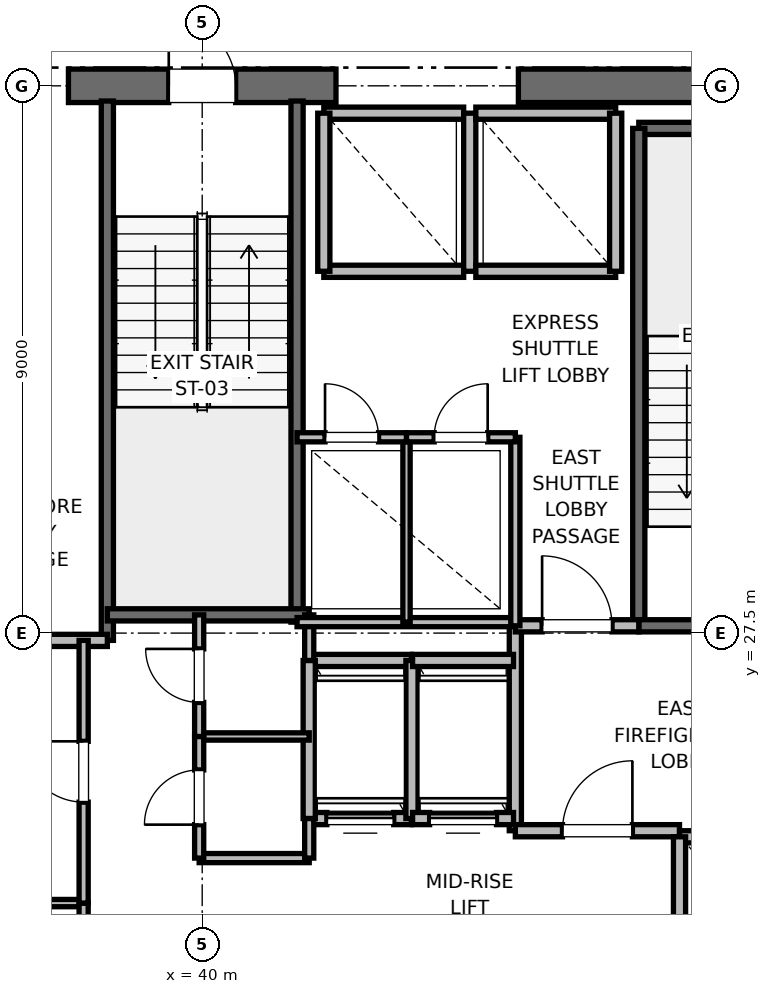
"""IFC4 building model, lengths in metres.
Left out: names, types, materials, properties, quantities, classifications, styles, units other than length and angle.
Written with IfcOpenShell. Run it as: python <this file> out.ifc"""

import sys

from ifc_helpers import new_model, si_unit, direction, frame, frame_2d, origin, place, context, subcontext, project, spatial, rectangle, extrude, element, fill, save


model = new_model("IFC4")
c1 = context("Model", 3, precision=1e-05, world=origin(), true_north=direction((0.0, 1.0)))
c2 = subcontext(c1, "Body", "Model", "MODEL_VIEW")
j1 = project(units=[si_unit("LENGTHUNIT", "METRE"), si_unit("PLANEANGLEUNIT", "RADIAN")], contexts=[c1])
p1 = place(None, origin())
s1 = spatial("IfcSite", under=j1, at=p1, CompositionType="ELEMENT")
p2 = place(p1, origin())
s2 = spatial("IfcBuilding", under=s1, at=p2, CompositionType="ELEMENT")
p3 = place(p2, frame((0.0, 0.0, 132.4)))
s3 = spatial("IfcBuildingStorey", under=s2, at=p3, CompositionType="ELEMENT", Elevation=132.4)
p4 = place(p3, frame((37.8, 36.5, 0.0), z_axis=(0.0, 0.0, 1.0), x_axis=(1.0, 0.0, 0.0)))
e1 = element("IfcWall", 1, at=p4, inside=s3, PredefinedType="SHEAR", context=c2, shape_type="SweptSolid", body=[
    extrude(rectangle(XDim=4.4, YDim=0.55, at=frame_2d((2.2, 0.0))), origin(), (0.0, 0.0, 1.0), 3.775),
])
p5 = place(p4, frame((1.65, 0.0, 0.0)))
e2 = element("IfcOpeningElement", 2, at=p5, cuts=e1, PredefinedType="OPENING", context=c2, shape_type="SweptSolid", body=[
    extrude(rectangle(XDim=1.1, YDim=2.15, at=frame_2d((0.55, 1.075))), frame((0.0, 0.275, 0.0), z_axis=(0.0, -1.0, 0.0), x_axis=(1.0, 0.0, 0.0)), (0.0, 0.0, 1.0), 0.55),
])
p6 = place(p3, frame((45.2, 36.5, 0.0), z_axis=(0.0, 0.0, 1.0), x_axis=(1.0, 0.0, 0.0)))
e3 = element("IfcWall", 3, at=p6, inside=s3, PredefinedType="SHEAR", context=c2, shape_type="SweptSolid", body=[
    extrude(rectangle(XDim=5.8, YDim=0.55, at=frame_2d((2.9, 0.0))), origin(), (0.0, 0.0, 1.0), 3.775),
])
p7 = place(p3, frame((47.18, 35.8, 0.0), z_axis=(0.0, 0.0, 1.0), x_axis=(1.0, 0.0, 0.0)))
e4 = element("IfcWall", 4, at=p7, inside=s3, PredefinedType="SOLIDWALL", context=c2, shape_type="SweptSolid", body=[
    extrude(rectangle(XDim=3.12, YDim=0.2, at=frame_2d((1.56, 0.0))), origin(), (0.0, 0.0, 1.0), 3.775),
])
p8 = place(p3, frame((47.18, 27.62, 0.0), z_axis=(0.0, 0.0, 1.0), x_axis=(0.0, 1.0, 0.0)))
e5 = element("IfcWall", 5, at=p8, inside=s3, PredefinedType="SOLIDWALL", context=c2, shape_type="SweptSolid", body=[
    extrude(rectangle(XDim=8.18, YDim=0.2, at=frame_2d((4.09, 0.0))), origin(), (0.0, 0.0, 1.0), 3.775),
])
p9 = place(p3, frame((47.18, 27.62, 0.0), z_axis=(0.0, 0.0, 1.0), x_axis=(1.0, 0.0, 0.0)))
e6 = element("IfcWall", 6, at=p9, inside=s3, PredefinedType="SOLIDWALL", context=c2, shape_type="SweptSolid", body=[
    extrude(rectangle(XDim=3.12, YDim=0.2, at=frame_2d((1.56, 0.0))), origin(), (0.0, 0.0, 1.0), 3.775),
])
p10 = place(p9, frame((1.01, 0.0, 0.0)))
e7 = element("IfcOpeningElement", 7, at=p10, cuts=e6, PredefinedType="OPENING", context=c2, shape_type="SweptSolid", body=[
    extrude(rectangle(XDim=1.1, YDim=2.15, at=frame_2d((0.55, 1.075))), frame((0.0, 0.1, 0.0), z_axis=(0.0, -1.0, 0.0), x_axis=(1.0, 0.0, 0.0)), (0.0, 0.0, 1.0), 0.2),
])
p11 = place(p3, frame((38.44, 27.38, 0.0), z_axis=(0.0, 0.0, 1.0), x_axis=(0.0, 1.0, 0.0)))
e8 = element("IfcWall", 8, at=p11, inside=s3, PredefinedType="SOLIDWALL", context=c2, shape_type="SweptSolid", body=[
    extrude(rectangle(XDim=8.87, YDim=0.2, at=frame_2d((4.435, 0.0))), origin(), (0.0, 0.0, 1.0), 3.775),
])
p12 = place(p3, frame((41.56, 27.68, 0.0), z_axis=(0.0, 0.0, 1.0), x_axis=(0.0, 1.0, 0.0)))
e9 = element("IfcWall", 9, at=p12, inside=s3, PredefinedType="SOLIDWALL", context=c2, shape_type="SweptSolid", body=[
    extrude(rectangle(XDim=8.57, YDim=0.2, at=frame_2d((4.285, 0.0))), origin(), (0.0, 0.0, 1.0), 3.775),
])
p13 = place(p3, frame((38.44, 27.8, 0.0), z_axis=(0.0, 0.0, 1.0), x_axis=(1.0, 0.0, 0.0)))
e10 = element("IfcWall", 10, at=p13, inside=s3, PredefinedType="SOLIDWALL", context=c2, shape_type="SweptSolid", body=[
    extrude(rectangle(XDim=3.32, YDim=0.2, at=frame_2d((1.66, 0.0))), origin(), (0.0, 0.0, 1.0), 3.775),
])
p14 = place(p3, frame((32.82, 27.38, 0.0), z_axis=(0.0, 0.0, 1.0), x_axis=(1.0, 0.0, 0.0)))
e11 = element("IfcWall", 11, at=p14, inside=s3, PredefinedType="PARTITIONING", context=c2, shape_type="SweptSolid", body=[
    extrude(rectangle(XDim=5.62, YDim=0.2, at=frame_2d((2.81, 0.0))), origin(), (0.0, 0.0, 1.0), 3.775),
])
p15 = place(p3, frame((45.15, 24.25, 0.0), z_axis=(0.0, 0.0, 1.0), x_axis=(0.0, 1.0, 0.0)))
e12 = element("IfcWall", 12, at=p15, inside=s3, PredefinedType="PARTITIONING", context=c2, shape_type="SweptSolid", body=[
    extrude(rectangle(XDim=3.37, YDim=0.2, at=frame_2d((1.685, 0.0))), origin(), (0.0, 0.0, 1.0), 3.775),
])
p16 = place(p3, frame((45.15, 24.25, 0.0), z_axis=(0.0, 0.0, 1.0), x_axis=(1.0, 0.0, 0.0)))
e13 = element("IfcWall", 13, at=p16, inside=s3, PredefinedType="PARTITIONING", context=c2, shape_type="SweptSolid", body=[
    extrude(rectangle(XDim=2.7, YDim=0.2, at=frame_2d((1.35, 0.0))), origin(), (0.0, 0.0, 1.0), 3.775),
])
p17 = place(p16, frame((0.775, 0.0, 0.0)))
e14 = element("IfcOpeningElement", 14, at=p17, cuts=e13, PredefinedType="OPENING", context=c2, shape_type="SweptSolid", body=[
    extrude(rectangle(XDim=1.15, YDim=2.2, at=frame_2d((0.575, 1.1))), frame((0.0, 0.1, 0.0), z_axis=(0.0, -1.0, 0.0), x_axis=(1.0, 0.0, 0.0)), (0.0, 0.0, 1.0), 0.2),
])
p18 = place(p3, frame((45.15, 27.62, 0.0), z_axis=(0.0, 0.0, 1.0), x_axis=(1.0, 0.0, 0.0)))
e15 = element("IfcWall", 15, at=p18, inside=s3, PredefinedType="PARTITIONING", context=c2, shape_type="SweptSolid", body=[
    extrude(rectangle(XDim=2.03, YDim=0.2, at=frame_2d((1.015, 0.0))), origin(), (0.0, 0.0, 1.0), 3.775),
])
p19 = place(p18, frame((0.44, 0.0, 0.0)))
e16 = element("IfcOpeningElement", 16, at=p19, cuts=e15, PredefinedType="OPENING", context=c2, shape_type="SweptSolid", body=[
    extrude(rectangle(XDim=1.15, YDim=2.2, at=frame_2d((0.575, 1.1))), frame((0.0, 0.1, 0.0), z_axis=(0.0, -1.0, 0.0), x_axis=(1.0, 0.0, 0.0)), (0.0, 0.0, 1.0), 0.2),
])
p20 = place(p3, frame((50.45, 24.15, 0.0), z_axis=(0.0, 0.0, 1.0), x_axis=(-1.0, 0.0, 0.0)))
e17 = element("IfcWall", 17, at=p20, inside=s3, PredefinedType="SOLIDWALL", context=c2, shape_type="SweptSolid", body=[
    extrude(rectangle(XDim=2.6, YDim=0.2, at=frame_2d((1.3, 0.0))), origin(), (0.0, 0.0, 1.0), 2.755),
])
p21 = place(p20, frame((0.75, 0.0, 0.0)))
e18 = element("IfcOpeningElement", 18, at=p21, cuts=e17, PredefinedType="OPENING", context=c2, shape_type="SweptSolid", body=[
    extrude(rectangle(XDim=1.1, YDim=2.2, at=frame_2d((0.55, 1.1))), frame((0.0, 0.1, 0.0), z_axis=(0.0, -1.0, 0.0), x_axis=(1.0, 0.0, 0.0)), (0.0, 0.0, 1.0), 0.2),
])
p22 = place(p3, frame((47.85, 24.15, 0.0), z_axis=(0.0, 0.0, 1.0), x_axis=(0.0, -1.0, 0.0)))
e19 = element("IfcWall", 19, at=p22, inside=s3, PredefinedType="SOLIDWALL", context=c2, shape_type="SweptSolid", body=[
    extrude(rectangle(XDim=3.0, YDim=0.2, at=frame_2d((1.5, 0.0))), origin(), (0.0, 0.0, 1.0), 3.775),
])
p23 = place(p3, frame((41.76, 24.45, 0.0), z_axis=(0.0, 0.0, 1.0), x_axis=(1.0, 0.0, 0.0)))
e20 = element("IfcWall", 20, at=p23, inside=s3, PredefinedType="SOLIDWALL", context=c2, shape_type="SweptSolid", body=[
    extrude(rectangle(XDim=1.68, YDim=0.2, at=frame_2d((0.84, 0.0))), origin(), (0.0, 0.0, 1.0), 3.775),
])
p24 = place(p23, frame((0.29, 0.0, 0.0)))
e21 = element("IfcOpeningElement", 21, at=p24, cuts=e20, PredefinedType="OPENING", context=c2, shape_type="SweptSolid", body=[
    extrude(rectangle(XDim=1.1, YDim=2.2, at=frame_2d((0.55, 1.1))), frame((0.0, 0.1, 0.0), z_axis=(0.0, -1.0, 0.0), x_axis=(1.0, 0.0, 0.0)), (0.0, 0.0, 1.0), 0.2),
])
p25 = place(p3, frame((43.44, 27.05, 0.0), z_axis=(0.0, 0.0, 1.0), x_axis=(-1.0, 0.0, 0.0)))
e22 = element("IfcWall", 22, at=p25, inside=s3, PredefinedType="SOLIDWALL", context=c2, shape_type="SweptSolid", body=[
    extrude(rectangle(XDim=1.68, YDim=0.2, at=frame_2d((0.84, 0.0))), origin(), (0.0, 0.0, 1.0), 3.775),
])
for number, where, z_axis, x_axis in (
    (23, (41.76, 27.05, 0.0), (0.0, 0.0, 1.0), (0.0, -1.0, 0.0)),
    (24, (43.45, 24.45, 0.0), (0.0, 0.0, 1.0), (0.0, 1.0, 0.0)),
):
    element("IfcWall", number, at=place(p3, frame(where, z_axis=z_axis, x_axis=x_axis)), inside=s3, PredefinedType="SOLIDWALL", context=c2, shape_type="SweptSolid", body=[
        extrude(rectangle(XDim=2.6, YDim=0.2, at=frame_2d((1.3, 0.0))), origin(), (0.0, 0.0, 1.0), 3.775),
    ])
p26 = place(p3, frame((43.46, 24.45, 0.0), z_axis=(0.0, 0.0, 1.0), x_axis=(1.0, 0.0, 0.0)))
e25 = element("IfcWall", 25, at=p26, inside=s3, PredefinedType="SOLIDWALL", context=c2, shape_type="SweptSolid", body=[
    extrude(rectangle(XDim=1.66, YDim=0.2, at=frame_2d((0.83, 0.0))), origin(), (0.0, 0.0, 1.0), 3.775),
])
p27 = place(p26, frame((0.28, 0.0, 0.0)))
e26 = element("IfcOpeningElement", 26, at=p27, cuts=e25, PredefinedType="OPENING", context=c2, shape_type="SweptSolid", body=[
    extrude(rectangle(XDim=1.1, YDim=2.2, at=frame_2d((0.55, 1.1))), frame((0.0, 0.1, 0.0), z_axis=(0.0, -1.0, 0.0), x_axis=(1.0, 0.0, 0.0)), (0.0, 0.0, 1.0), 0.2),
])
p28 = place(p3, frame((45.12, 27.05, 0.0), z_axis=(0.0, 0.0, 1.0), x_axis=(-1.0, 0.0, 0.0)))
e27 = element("IfcWall", 27, at=p28, inside=s3, PredefinedType="SOLIDWALL", context=c2, shape_type="SweptSolid", body=[
    extrude(rectangle(XDim=1.66, YDim=0.2, at=frame_2d((0.83, 0.0))), origin(), (0.0, 0.0, 1.0), 3.775),
])
p29 = place(p3, frame((42.0, 33.45, 0.0), z_axis=(0.0, 0.0, 1.0), x_axis=(1.0, 0.0, 0.0)))
e28 = element("IfcWall", 28, at=p29, inside=s3, PredefinedType="SOLIDWALL", context=c2, shape_type="SweptSolid", body=[
    extrude(rectangle(XDim=2.3, YDim=0.2, at=frame_2d((1.15, 0.0))), origin(), (0.0, 0.0, 1.0), 3.775),
])
p30 = place(p3, frame((44.3, 36.05, 0.0), z_axis=(0.0, 0.0, 1.0), x_axis=(-1.0, 0.0, 0.0)))
e29 = element("IfcWall", 29, at=p30, inside=s3, PredefinedType="SOLIDWALL", context=c2, shape_type="SweptSolid", body=[
    extrude(rectangle(XDim=2.3, YDim=0.2, at=frame_2d((1.15, 0.0))), origin(), (0.0, 0.0, 1.0), 2.755),
])
for number, where, z_axis, x_axis in (
    (30, (42.0, 36.05, 0.0), (0.0, 0.0, 1.0), (0.0, -1.0, 0.0)),
    (31, (44.4, 33.45, 0.0), (0.0, 0.0, 1.0), (0.0, 1.0, 0.0)),
):
    element("IfcWall", number, at=place(p3, frame(where, z_axis=z_axis, x_axis=x_axis)), inside=s3, PredefinedType="SOLIDWALL", context=c2, shape_type="SweptSolid", body=[
        extrude(rectangle(XDim=2.6, YDim=0.2, at=frame_2d((1.3, 0.0))), origin(), (0.0, 0.0, 1.0), 2.755),
    ])
p31 = place(p3, frame((44.5, 33.45, 0.0), z_axis=(0.0, 0.0, 1.0), x_axis=(1.0, 0.0, 0.0)))
e32 = element("IfcWall", 32, at=p31, inside=s3, PredefinedType="SOLIDWALL", context=c2, shape_type="SweptSolid", body=[
    extrude(rectangle(XDim=2.3, YDim=0.2, at=frame_2d((1.15, 0.0))), origin(), (0.0, 0.0, 1.0), 3.775),
])
p32 = place(p3, frame((46.8, 36.05, 0.0), z_axis=(0.0, 0.0, 1.0), x_axis=(-1.0, 0.0, 0.0)))
e33 = element("IfcWall", 33, at=p32, inside=s3, PredefinedType="SOLIDWALL", context=c2, shape_type="SweptSolid", body=[
    extrude(rectangle(XDim=2.3, YDim=0.2, at=frame_2d((1.15, 0.0))), origin(), (0.0, 0.0, 1.0), 2.755),
])
p33 = place(p3, frame((46.8, 33.45, 0.0), z_axis=(0.0, 0.0, 1.0), x_axis=(0.0, 1.0, 0.0)))
e34 = element("IfcWall", 34, at=p33, inside=s3, PredefinedType="SOLIDWALL", context=c2, shape_type="SweptSolid", body=[
    extrude(rectangle(XDim=2.6, YDim=0.2, at=frame_2d((1.3, 0.0))), origin(), (0.0, 0.0, 1.0), 3.775),
])
p34 = place(p3, frame((39.95, 23.8, 0.0), z_axis=(0.0, 0.0, 1.0), x_axis=(1.0, 0.0, 0.0)))
e35 = element("IfcWall", 35, at=p34, inside=s3, PredefinedType="PARTITIONING", context=c2, shape_type="SweptSolid", body=[
    extrude(rectangle(XDim=1.81, YDim=0.15, at=frame_2d((0.905, 0.0))), origin(), (0.0, 0.0, 1.0), 2.85),
])
p35 = place(p3, frame((39.95, 25.8, 0.0), z_axis=(0.0, 0.0, 1.0), x_axis=(1.0, 0.0, 0.0)))
e36 = element("IfcWall", 36, at=p35, inside=s3, PredefinedType="PARTITIONING", context=c2, shape_type="SweptSolid", body=[
    extrude(rectangle(XDim=1.81, YDim=0.12, at=frame_2d((0.905, 0.0))), origin(), (0.0, 0.0, 1.0), 2.85),
])
p36 = place(p3, frame((41.76, 23.8, 0.0), z_axis=(0.0, 0.0, 1.0), x_axis=(0.0, 1.0, 0.0)))
e37 = element("IfcWall", 37, at=p36, inside=s3, PredefinedType="PARTITIONING", context=c2, shape_type="SweptSolid", body=[
    extrude(rectangle(XDim=0.65, YDim=0.15, at=frame_2d((0.325, 0.0))), origin(), (0.0, 0.0, 1.0), 2.85),
])
p37 = place(p3, frame((41.76, 27.05, 0.0), z_axis=(0.0, 0.0, 1.0), x_axis=(0.0, 1.0, 0.0)))
e38 = element("IfcWall", 38, at=p37, inside=s3, PredefinedType="PARTITIONING", context=c2, shape_type="SweptSolid", body=[
    extrude(rectangle(XDim=0.75, YDim=0.15, at=frame_2d((0.375, 0.0))), origin(), (0.0, 0.0, 1.0), 2.85),
])
p38 = place(p3, frame((39.95, 23.8, 0.0), z_axis=(0.0, 0.0, 1.0), x_axis=(0.0, 1.0, 0.0)))
e39 = element("IfcWall", 39, at=p38, inside=s3, PredefinedType="PARTITIONING", context=c2, shape_type="SweptSolid", body=[
    extrude(rectangle(XDim=2.0, YDim=0.15, at=frame_2d((1.0, 0.0))), origin(), (0.0, 0.0, 1.0), 2.85),
])
p39 = place(p38, frame((0.55, 0.0, 0.0)))
e40 = element("IfcOpeningElement", 40, at=p39, cuts=e39, PredefinedType="OPENING", context=c2, shape_type="SweptSolid", body=[
    extrude(rectangle(XDim=0.9, YDim=2.1, at=frame_2d((0.45, 1.05))), frame((0.0, 0.075, 0.0), z_axis=(0.0, -1.0, 0.0), x_axis=(1.0, 0.0, 0.0)), (0.0, 0.0, 1.0), 0.15),
])
p40 = place(p3, frame((39.95, 25.8, 0.0), z_axis=(0.0, 0.0, 1.0), x_axis=(0.0, 1.0, 0.0)))
e41 = element("IfcWall", 41, at=p40, inside=s3, PredefinedType="PARTITIONING", context=c2, shape_type="SweptSolid", body=[
    extrude(rectangle(XDim=2.0, YDim=0.15, at=frame_2d((1.0, 0.0))), origin(), (0.0, 0.0, 1.0), 2.85),
])
p41 = place(p40, frame((0.56, 0.0, 0.0)))
e42 = element("IfcOpeningElement", 42, at=p41, cuts=e41, PredefinedType="OPENING", context=c2, shape_type="SweptSolid", body=[
    extrude(rectangle(XDim=0.88, YDim=2.1, at=frame_2d((0.44, 1.05))), frame((0.0, 0.075, 0.0), z_axis=(0.0, -1.0, 0.0), x_axis=(1.0, 0.0, 0.0)), (0.0, 0.0, 1.0), 0.15),
])
p42 = place(p3, frame((32.82, 23.06, 0.0), z_axis=(0.0, 0.0, 1.0), x_axis=(1.0, 0.0, 0.0)))
e43 = element("IfcWall", 43, at=p42, inside=s3, PredefinedType="PARTITIONING", context=c2, shape_type="SweptSolid", body=[
    extrude(rectangle(XDim=5.23, YDim=0.12, at=frame_2d((2.615, 0.0))), origin(), (0.0, 0.0, 1.0), 2.85),
])
p43 = place(p3, frame((38.05, 18.6, 0.0), z_axis=(0.0, 0.0, 1.0), x_axis=(0.0, 1.0, 0.0)))
e44 = element("IfcWall", 44, at=p43, inside=s3, PredefinedType="PARTITIONING", context=c2, shape_type="SweptSolid", body=[
    extrude(rectangle(XDim=4.46, YDim=0.15, at=frame_2d((2.23, 0.0))), origin(), (0.0, 0.0, 1.0), 2.755),
])
p44 = place(p43, frame((1.73, 0.0, 0.0)))
e45 = element("IfcOpeningElement", 45, at=p44, cuts=e44, PredefinedType="OPENING", context=c2, shape_type="SweptSolid", body=[
    extrude(rectangle(XDim=1.0, YDim=2.15, at=frame_2d((0.5, 1.075))), frame((0.0, 0.075, 0.0), z_axis=(0.0, -1.0, 0.0), x_axis=(1.0, 0.0, 0.0)), (0.0, 0.0, 1.0), 0.15),
])
p45 = place(p3, frame((38.05, 23.06, 0.0), z_axis=(0.0, 0.0, 1.0), x_axis=(0.0, 1.0, 0.0)))
e46 = element("IfcWall", 46, at=p45, inside=s3, PredefinedType="PARTITIONING", context=c2, shape_type="SweptSolid", body=[
    extrude(rectangle(XDim=4.32, YDim=0.15, at=frame_2d((2.16, 0.0))), origin(), (0.0, 0.0, 1.0), 2.85),
])
p46 = place(p45, frame((1.66, 0.0, 0.0)))
e47 = element("IfcOpeningElement", 47, at=p46, cuts=e46, PredefinedType="OPENING", context=c2, shape_type="SweptSolid", body=[
    extrude(rectangle(XDim=1.0, YDim=2.15, at=frame_2d((0.5, 1.075))), frame((0.0, 0.075, 0.0), z_axis=(0.0, -1.0, 0.0), x_axis=(1.0, 0.0, 0.0)), (0.0, 0.0, 1.0), 0.15),
])
p47 = place(p3, frame((41.56, 27.68, 0.0), z_axis=(0.0, 0.0, 1.0), x_axis=(1.0, 0.0, 0.0)))
e48 = element("IfcWall", 48, at=p47, inside=s3, PredefinedType="PARTITIONING", context=c2, shape_type="SweptSolid", body=[
    extrude(rectangle(XDim=3.59, YDim=0.15, at=frame_2d((1.795, 0.0))), origin(), (0.0, 0.0, 1.0), 2.85),
])
p48 = place(p3, frame((45.15, 27.62, 0.0), z_axis=(0.0, 0.0, 1.0), x_axis=(0.0, 1.0, 0.0)))
e49 = element("IfcWall", 49, at=p48, inside=s3, PredefinedType="PARTITIONING", context=c2, shape_type="SweptSolid", body=[
    extrude(rectangle(XDim=3.1, YDim=0.15, at=frame_2d((1.55, 0.0))), origin(), (0.0, 0.0, 1.0), 2.85),
])
p49 = place(p3, frame((43.36, 27.68, 0.0), z_axis=(0.0, 0.0, 1.0), x_axis=(0.0, 1.0, 0.0)))
e50 = element("IfcWall", 50, at=p49, inside=s3, PredefinedType="PARTITIONING", context=c2, shape_type="SweptSolid", body=[
    extrude(rectangle(XDim=3.04, YDim=0.12, at=frame_2d((1.52, 0.0))), origin(), (0.0, 0.0, 1.0), 2.85),
])
p50 = place(p3, frame((41.56, 30.72, 0.0), z_axis=(0.0, 0.0, 1.0), x_axis=(1.0, 0.0, 0.0)))
e51 = element("IfcWall", 51, at=p50, inside=s3, PredefinedType="PARTITIONING", context=c2, shape_type="SweptSolid", body=[
    extrude(rectangle(XDim=1.8, YDim=0.15, at=frame_2d((0.9, 0.0))), origin(), (0.0, 0.0, 1.0), 2.85),
])
p51 = place(p50, frame((0.46, 0.0, 0.0)))
e52 = element("IfcOpeningElement", 52, at=p51, cuts=e51, PredefinedType="OPENING", context=c2, shape_type="SweptSolid", body=[
    extrude(rectangle(XDim=0.88, YDim=2.1, at=frame_2d((0.44, 1.05))), frame((0.0, 0.075, 0.0), z_axis=(0.0, -1.0, 0.0), x_axis=(1.0, 0.0, 0.0)), (0.0, 0.0, 1.0), 0.15),
])
p52 = place(p3, frame((43.36, 30.72, 0.0), z_axis=(0.0, 0.0, 1.0), x_axis=(1.0, 0.0, 0.0)))
e53 = element("IfcWall", 53, at=p52, inside=s3, PredefinedType="PARTITIONING", context=c2, shape_type="SweptSolid", body=[
    extrude(rectangle(XDim=1.79, YDim=0.15, at=frame_2d((0.895, 0.0))), origin(), (0.0, 0.0, 1.0), 2.85),
])
p53 = place(p52, frame((0.455, 0.0, 0.0)))
e54 = element("IfcOpeningElement", 54, at=p53, cuts=e53, PredefinedType="OPENING", context=c2, shape_type="SweptSolid", body=[
    extrude(rectangle(XDim=0.88, YDim=2.1, at=frame_2d((0.44, 1.05))), frame((0.0, 0.075, 0.0), z_axis=(0.0, -1.0, 0.0), x_axis=(1.0, 0.0, 0.0)), (0.0, 0.0, 1.0), 0.15),
])
p54 = place(p5, origin())
e55 = element("IfcDoor", 55, at=p54, inside=s3, OperationType="SINGLE_SWING_LEFT", PredefinedType="DOOR", context=c2, shape_type="SweptSolid", body=[
    extrude(rectangle(XDim=1.1, YDim=2.15, at=frame_2d((0.55, 1.075))), frame((0.0, 0.025, 0.0), z_axis=(0.0, -1.0, 0.0), x_axis=(1.0, 0.0, 0.0)), (0.0, 0.0, 1.0), 0.05),
])
fill(e2, e55)
p55 = place(p17, origin())
e56 = element("IfcDoor", 56, at=p55, inside=s3, OperationType="SINGLE_SWING_RIGHT", PredefinedType="DOOR", context=c2, shape_type="SweptSolid", body=[
    extrude(rectangle(XDim=1.15, YDim=2.2, at=frame_2d((0.575, 1.1))), frame((0.0, 0.025, 0.0), z_axis=(0.0, -1.0, 0.0), x_axis=(1.0, 0.0, 0.0)), (0.0, 0.0, 1.0), 0.05),
])
fill(e14, e56)
p56 = place(p19, origin())
e57 = element("IfcDoor", 57, at=p56, inside=s3, OperationType="SINGLE_SWING_LEFT", PredefinedType="DOOR", context=c2, shape_type="SweptSolid", body=[
    extrude(rectangle(XDim=1.15, YDim=2.2, at=frame_2d((0.575, 1.1))), frame((0.0, 0.025, 0.0), z_axis=(0.0, -1.0, 0.0), x_axis=(1.0, 0.0, 0.0)), (0.0, 0.0, 1.0), 0.05),
])
fill(e16, e57)
p57 = place(p24, origin())
e58 = element("IfcDoor", 58, at=p57, inside=s3, OperationType="SLIDING_TO_RIGHT", PredefinedType="DOOR", context=c2, shape_type="SweptSolid", body=[
    extrude(rectangle(XDim=1.1, YDim=2.2, at=frame_2d((0.55, 1.1))), frame((0.0, 0.025, 0.0), z_axis=(0.0, -1.0, 0.0), x_axis=(1.0, 0.0, 0.0)), (0.0, 0.0, 1.0), 0.05),
])
fill(e21, e58)
p58 = place(p27, origin())
e59 = element("IfcDoor", 59, at=p58, inside=s3, OperationType="SLIDING_TO_RIGHT", PredefinedType="DOOR", context=c2, shape_type="SweptSolid", body=[
    extrude(rectangle(XDim=1.1, YDim=2.2, at=frame_2d((0.55, 1.1))), frame((0.0, 0.025, 0.0), z_axis=(0.0, -1.0, 0.0), x_axis=(1.0, 0.0, 0.0)), (0.0, 0.0, 1.0), 0.05),
])
fill(e26, e59)
p59 = place(p39, origin())
e60 = element("IfcDoor", 60, at=p59, inside=s3, OperationType="SINGLE_SWING_LEFT", PredefinedType="DOOR", context=c2, shape_type="SweptSolid", body=[
    extrude(rectangle(XDim=0.9, YDim=2.1, at=frame_2d((0.45, 1.05))), frame((0.0, 0.025, 0.0), z_axis=(0.0, -1.0, 0.0), x_axis=(1.0, 0.0, 0.0)), (0.0, 0.0, 1.0), 0.05),
])
fill(e40, e60)
p60 = place(p41, origin())
e61 = element("IfcDoor", 61, at=p60, inside=s3, OperationType="SINGLE_SWING_RIGHT", PredefinedType="DOOR", context=c2, shape_type="SweptSolid", body=[
    extrude(rectangle(XDim=0.88, YDim=2.1, at=frame_2d((0.44, 1.05))), frame((0.0, 0.025, 0.0), z_axis=(0.0, -1.0, 0.0), x_axis=(1.0, 0.0, 0.0)), (0.0, 0.0, 1.0), 0.05),
])
fill(e42, e61)
p61 = place(p46, origin())
e62 = element("IfcDoor", 62, at=p61, inside=s3, OperationType="SINGLE_SWING_RIGHT", PredefinedType="DOOR", context=c2, shape_type="SweptSolid", body=[
    extrude(rectangle(XDim=1.0, YDim=2.15, at=frame_2d((0.5, 1.075))), frame((0.0, 0.025, 0.0), z_axis=(0.0, -1.0, 0.0), x_axis=(1.0, 0.0, 0.0)), (0.0, 0.0, 1.0), 0.05),
])
fill(e47, e62)
p62 = place(p51, origin())
e63 = element("IfcDoor", 63, at=p62, inside=s3, OperationType="SINGLE_SWING_LEFT", PredefinedType="DOOR", context=c2, shape_type="SweptSolid", body=[
    extrude(rectangle(XDim=0.88, YDim=2.1, at=frame_2d((0.44, 1.05))), frame((0.0, 0.025, 0.0), z_axis=(0.0, -1.0, 0.0), x_axis=(1.0, 0.0, 0.0)), (0.0, 0.0, 1.0), 0.05),
])
fill(e52, e63)
p63 = place(p53, origin())
e64 = element("IfcDoor", 64, at=p63, inside=s3, OperationType="SINGLE_SWING_RIGHT", PredefinedType="DOOR", context=c2, shape_type="SweptSolid", body=[
    extrude(rectangle(XDim=0.88, YDim=2.1, at=frame_2d((0.44, 1.05))), frame((0.0, 0.025, 0.0), z_axis=(0.0, -1.0, 0.0), x_axis=(1.0, 0.0, 0.0)), (0.0, 0.0, 1.0), 0.05),
])
fill(e54, e64)
save(model, sys.argv[1])
